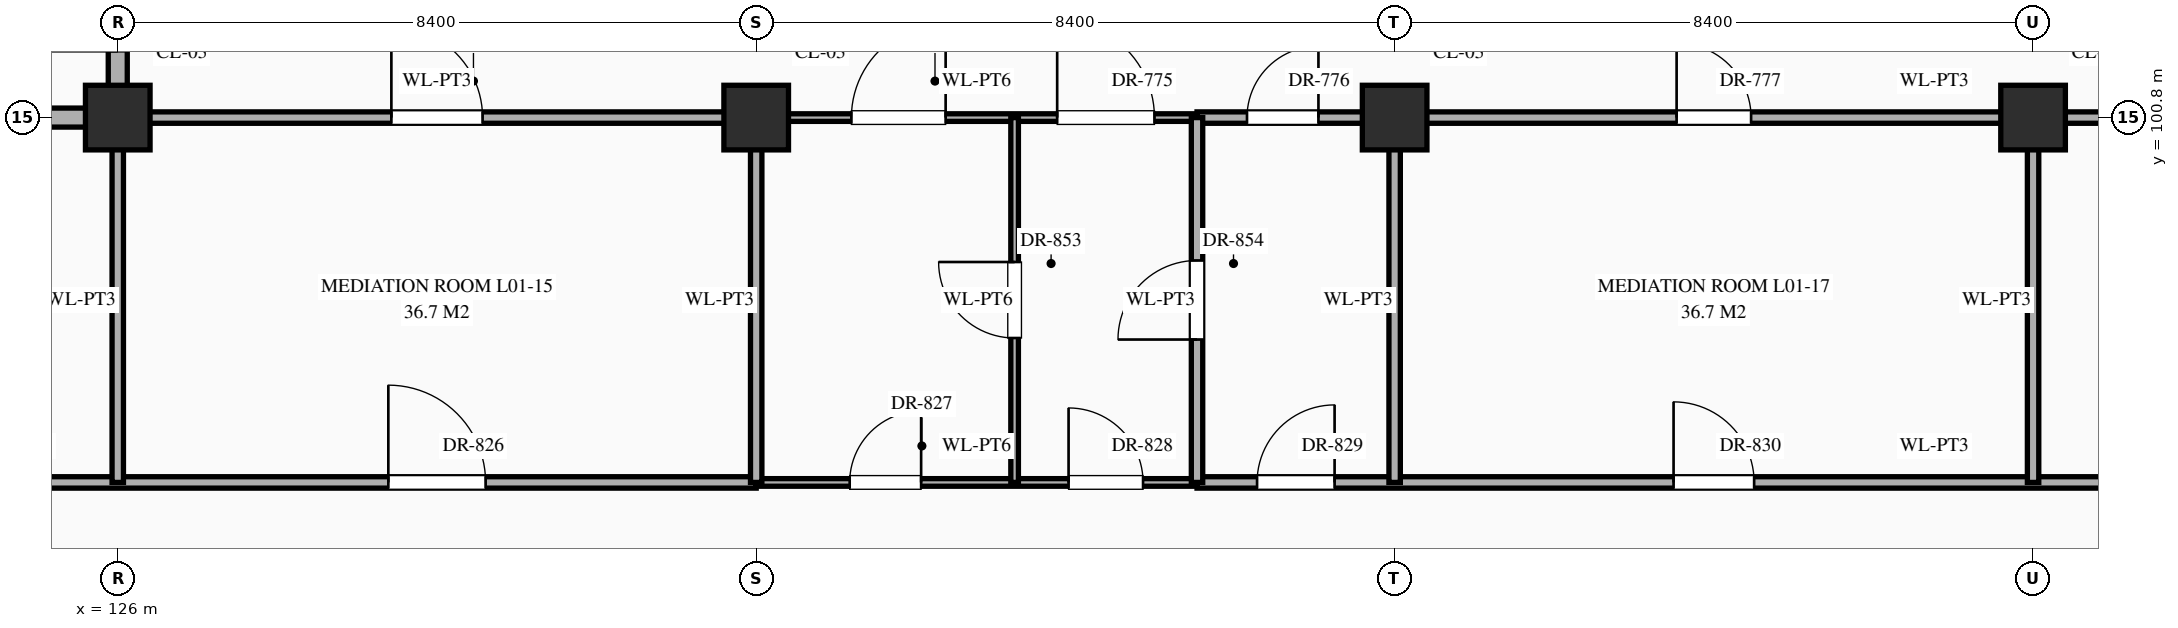
"""IFC4 building model, lengths in metres.
Left out: names, types, materials, properties, quantities, classifications, styles, units other than length and angle.
Written with IfcOpenShell. Run it as: python <this file> out.ifc"""

import sys

from ifc_helpers import new_model, si_unit, direction, frame, frame_2d, origin, origin_2d, place, context, subcontext, project, spatial, rectangle, extrude, element, fill, save


model = new_model("IFC4")
c1 = context("Model", 3, precision=1e-05, world=origin(), true_north=direction((0.0, 1.0)))
c2 = subcontext(c1, "Body", "Model", "MODEL_VIEW")
j1 = project(units=[si_unit("LENGTHUNIT", "METRE"), si_unit("PLANEANGLEUNIT", "RADIAN")], contexts=[c1])
p1 = place(None, origin())
s1 = spatial("IfcSite", under=j1, at=p1, CompositionType="ELEMENT")
p2 = place(p1, origin())
s2 = spatial("IfcBuilding", under=s1, at=p2, CompositionType="ELEMENT")
p3 = place(p2, origin())
s3 = spatial("IfcBuildingStorey", under=s2, at=p3, CompositionType="ELEMENT", Elevation=0.0)
for number, where, z_axis, x_axis in (
    (1, (126.0, 100.8, 0.0), (0.0, 0.0, 1.0), (1.0, 0.0, 0.0)),
    (2, (134.4, 100.8, 0.0), (0.0, 0.0, 1.0), (1.0, 0.0, 0.0)),
    (3, (142.8, 100.8, 0.0), (0.0, 0.0, 1.0), (1.0, 0.0, 0.0)),
    (4, (151.2, 100.8, 0.0), (0.0, 0.0, 1.0), (1.0, 0.0, 0.0)),
):
    element("IfcColumn", number, at=place(p3, frame(where, z_axis=z_axis, x_axis=x_axis)), inside=s3, PredefinedType="COLUMN", context=c2, shape_type="SweptSolid", body=[
        extrude(rectangle(XDim=0.85, YDim=0.85, at=origin_2d()), origin(), (0.0, 0.0, 1.0), 5.4),
    ])
p4 = place(p3, frame((115.0, 96.0, 0.0), z_axis=(0.0, 0.0, 1.0), x_axis=(1.0, 0.0, 0.0)))
e5 = element("IfcWall", 5, at=p4, inside=s3, PredefinedType="STANDARD", context=c2, shape_type="SweptSolid", body=[
    extrude(rectangle(XDim=19.4, YDim=0.15, at=frame_2d((9.7, 0.0))), origin(), (0.0, 0.0, 1.0), 5.12),
])
p5 = place(p4, frame((0.82, 0.0, 0.0)))
e6 = element("IfcOpeningElement", 6, at=p5, cuts=e5, PredefinedType="OPENING", context=c2, shape_type="SweptSolid", body=[
    extrude(rectangle(XDim=0.96, YDim=2.2, at=frame_2d((0.48, 1.1))), frame((0.0, 0.087, 0.0), z_axis=(0.0, -1.0, 0.0), x_axis=(1.0, 0.0, 0.0)), (0.0, 0.0, 1.0), 0.174),
])
p6 = place(p4, frame((6.18, 0.0, 0.0)))
e7 = element("IfcOpeningElement", 7, at=p6, cuts=e5, PredefinedType="OPENING", context=c2, shape_type="SweptSolid", body=[
    extrude(rectangle(XDim=1.24, YDim=2.3, at=frame_2d((0.62, 1.15))), frame((0.0, 0.087, 0.0), z_axis=(0.0, -1.0, 0.0), x_axis=(1.0, 0.0, 0.0)), (0.0, 0.0, 1.0), 0.174),
])
p7 = place(p4, frame((14.56, 0.0, 0.0)))
e8 = element("IfcOpeningElement", 8, at=p7, cuts=e5, PredefinedType="OPENING", context=c2, shape_type="SweptSolid", body=[
    extrude(rectangle(XDim=1.28, YDim=2.35, at=frame_2d((0.64, 1.175))), frame((0.0, 0.087, 0.0), z_axis=(0.0, -1.0, 0.0), x_axis=(1.0, 0.0, 0.0)), (0.0, 0.0, 1.0), 0.174),
])
p8 = place(p3, frame((134.4, 96.0, 0.0), z_axis=(0.0, 0.0, 1.0), x_axis=(1.0, 0.0, 0.0)))
e9 = element("IfcWall", 9, at=p8, inside=s3, PredefinedType="STANDARD", context=c2, shape_type="SweptSolid", body=[
    extrude(rectangle(XDim=5.8, YDim=0.1, at=frame_2d((2.9, 0.0))), origin(), (0.0, 0.0, 1.0), 5.12),
])
p9 = place(p8, frame((1.23, 0.0, 0.0)))
e10 = element("IfcOpeningElement", 10, at=p9, cuts=e9, PredefinedType="OPENING", context=c2, shape_type="SweptSolid", body=[
    extrude(rectangle(XDim=0.94, YDim=2.3, at=frame_2d((0.47, 1.15))), frame((0.0, 0.062, 0.0), z_axis=(0.0, -1.0, 0.0), x_axis=(1.0, 0.0, 0.0)), (0.0, 0.0, 1.0), 0.124),
])
p10 = place(p8, frame((4.11, 0.0, 0.0)))
e11 = element("IfcOpeningElement", 11, at=p10, cuts=e9, PredefinedType="OPENING", context=c2, shape_type="SweptSolid", body=[
    extrude(rectangle(XDim=0.98, YDim=2.35, at=frame_2d((0.49, 1.175))), frame((0.0, 0.062, 0.0), z_axis=(0.0, -1.0, 0.0), x_axis=(1.0, 0.0, 0.0)), (0.0, 0.0, 1.0), 0.124),
])
p11 = place(p3, frame((140.2, 96.0, 0.0), z_axis=(0.0, 0.0, 1.0), x_axis=(1.0, 0.0, 0.0)))
e12 = element("IfcWall", 12, at=p11, inside=s3, PredefinedType="STANDARD", context=c2, shape_type="SweptSolid", body=[
    extrude(rectangle(XDim=19.4, YDim=0.15, at=frame_2d((9.7, 0.0))), origin(), (0.0, 0.0, 1.0), 5.12),
])
p12 = place(p11, frame((0.79, 0.0, 0.0)))
e13 = element("IfcOpeningElement", 13, at=p12, cuts=e12, PredefinedType="OPENING", context=c2, shape_type="SweptSolid", body=[
    extrude(rectangle(XDim=1.02, YDim=2.4, at=frame_2d((0.51, 1.2))), frame((0.0, 0.087, 0.0), z_axis=(0.0, -1.0, 0.0), x_axis=(1.0, 0.0, 0.0)), (0.0, 0.0, 1.0), 0.174),
])
p13 = place(p11, frame((6.27, 0.0, 0.0)))
e14 = element("IfcOpeningElement", 14, at=p13, cuts=e12, PredefinedType="OPENING", context=c2, shape_type="SweptSolid", body=[
    extrude(rectangle(XDim=1.06, YDim=2.4, at=frame_2d((0.53, 1.2))), frame((0.0, 0.087, 0.0), z_axis=(0.0, -1.0, 0.0), x_axis=(1.0, 0.0, 0.0)), (0.0, 0.0, 1.0), 0.174),
])
p14 = place(p11, frame((14.63, 0.0, 0.0)))
e15 = element("IfcOpeningElement", 15, at=p14, cuts=e12, PredefinedType="OPENING", context=c2, shape_type="SweptSolid", body=[
    extrude(rectangle(XDim=1.14, YDim=2.4, at=frame_2d((0.57, 1.2))), frame((0.0, 0.087, 0.0), z_axis=(0.0, -1.0, 0.0), x_axis=(1.0, 0.0, 0.0)), (0.0, 0.0, 1.0), 0.174),
])
p15 = place(p3, frame((121.8, 100.8, 0.0), z_axis=(0.0, 0.0, 1.0), x_axis=(1.0, 0.0, 0.0)))
e16 = element("IfcWall", 16, at=p15, inside=s3, PredefinedType="STANDARD", context=c2, shape_type="SweptSolid", body=[
    extrude(rectangle(XDim=4.2, YDim=0.25, at=frame_2d((2.1, 0.0))), origin(), (0.0, 0.0, 1.0), 4.27),
])
p16 = place(p3, frame((126.0, 100.8, 0.0), z_axis=(0.0, 0.0, 1.0), x_axis=(1.0, 0.0, 0.0)))
e17 = element("IfcWall", 17, at=p16, inside=s3, PredefinedType="STANDARD", context=c2, shape_type="SweptSolid", body=[
    extrude(rectangle(XDim=8.4, YDim=0.15, at=frame_2d((4.2, 0.0))), origin(), (0.0, 0.0, 1.0), 4.27),
])
p17 = place(p16, frame((3.6, 0.0, 0.0)))
e18 = element("IfcOpeningElement", 18, at=p17, cuts=e17, PredefinedType="OPENING", context=c2, shape_type="SweptSolid", body=[
    extrude(rectangle(XDim=1.2, YDim=2.35, at=frame_2d((0.6, 1.175))), frame((0.0, 0.087, 0.0), z_axis=(0.0, -1.0, 0.0), x_axis=(1.0, 0.0, 0.0)), (0.0, 0.0, 1.0), 0.174),
])
p18 = place(p3, frame((134.4, 100.8, 0.0), z_axis=(0.0, 0.0, 1.0), x_axis=(1.0, 0.0, 0.0)))
e19 = element("IfcWall", 19, at=p18, inside=s3, PredefinedType="STANDARD", context=c2, shape_type="SweptSolid", body=[
    extrude(rectangle(XDim=5.8, YDim=0.1, at=frame_2d((2.9, 0.0))), origin(), (0.0, 0.0, 1.0), 4.27),
])
p19 = place(p18, frame((1.252, 0.0, 0.0)))
e20 = element("IfcOpeningElement", 20, at=p19, cuts=e19, PredefinedType="OPENING", context=c2, shape_type="SweptSolid", body=[
    extrude(rectangle(XDim=1.24, YDim=2.3, at=frame_2d((0.62, 1.15))), frame((0.0, 0.062, 0.0), z_axis=(0.0, -1.0, 0.0), x_axis=(1.0, 0.0, 0.0)), (0.0, 0.0, 1.0), 0.124),
])
p20 = place(p18, frame((3.96, 0.0, 0.0)))
e21 = element("IfcOpeningElement", 21, at=p20, cuts=e19, PredefinedType="OPENING", context=c2, shape_type="SweptSolid", body=[
    extrude(rectangle(XDim=1.28, YDim=2.35, at=frame_2d((0.64, 1.175))), frame((0.0, 0.062, 0.0), z_axis=(0.0, -1.0, 0.0), x_axis=(1.0, 0.0, 0.0)), (0.0, 0.0, 1.0), 0.124),
])
p21 = place(p3, frame((140.2, 100.8, 0.0), z_axis=(0.0, 0.0, 1.0), x_axis=(1.0, 0.0, 0.0)))
e22 = element("IfcWall", 22, at=p21, inside=s3, PredefinedType="STANDARD", context=c2, shape_type="SweptSolid", body=[
    extrude(rectangle(XDim=19.4, YDim=0.15, at=frame_2d((9.7, 0.0))), origin(), (0.0, 0.0, 1.0), 4.27),
])
p22 = place(p21, frame((0.657, 0.0, 0.0)))
e23 = element("IfcOpeningElement", 23, at=p22, cuts=e22, PredefinedType="OPENING", context=c2, shape_type="SweptSolid", body=[
    extrude(rectangle(XDim=0.94, YDim=2.3, at=frame_2d((0.47, 1.15))), frame((0.0, 0.087, 0.0), z_axis=(0.0, -1.0, 0.0), x_axis=(1.0, 0.0, 0.0)), (0.0, 0.0, 1.0), 0.174),
])
p23 = place(p21, frame((6.31, 0.0, 0.0)))
e24 = element("IfcOpeningElement", 24, at=p23, cuts=e22, PredefinedType="OPENING", context=c2, shape_type="SweptSolid", body=[
    extrude(rectangle(XDim=0.98, YDim=2.35, at=frame_2d((0.49, 1.175))), frame((0.0, 0.087, 0.0), z_axis=(0.0, -1.0, 0.0), x_axis=(1.0, 0.0, 0.0)), (0.0, 0.0, 1.0), 0.174),
])
p24 = place(p21, frame((14.69, 0.0, 0.0)))
e25 = element("IfcOpeningElement", 25, at=p24, cuts=e22, PredefinedType="OPENING", context=c2, shape_type="SweptSolid", body=[
    extrude(rectangle(XDim=1.02, YDim=2.4, at=frame_2d((0.51, 1.2))), frame((0.0, 0.087, 0.0), z_axis=(0.0, -1.0, 0.0), x_axis=(1.0, 0.0, 0.0)), (0.0, 0.0, 1.0), 0.174),
])
p25 = place(p3, frame((126.0, 96.0, 0.0), z_axis=(0.0, 0.0, 1.0), x_axis=(0.0, 1.0, 0.0)))
e26 = element("IfcWall", 26, at=p25, inside=s3, PredefinedType="STANDARD", context=c2, shape_type="SweptSolid", body=[
    extrude(rectangle(XDim=4.8, YDim=0.15, at=frame_2d((2.4, 0.0))), origin(), (0.0, 0.0, 1.0), 4.37),
])
p26 = place(p3, frame((126.0, 100.8, 0.0), z_axis=(0.0, 0.0, 1.0), x_axis=(0.0, 1.0, 0.0)))
e27 = element("IfcWall", 27, at=p26, inside=s3, PredefinedType="STANDARD", context=c2, shape_type="SweptSolid", body=[
    extrude(rectangle(XDim=3.6, YDim=0.25, at=frame_2d((1.8, 0.0))), origin(), (0.0, 0.0, 1.0), 4.37),
])
p27 = place(p26, frame((0.873, 0.0, 0.0)))
e28 = element("IfcOpeningElement", 28, at=p27, cuts=e27, PredefinedType="OPENING", context=c2, shape_type="SweptSolid", body=[
    extrude(rectangle(XDim=1.0, YDim=2.2, at=frame_2d((0.5, 1.1))), frame((0.0, 0.137, 0.0), z_axis=(0.0, -1.0, 0.0), x_axis=(1.0, 0.0, 0.0)), (0.0, 0.0, 1.0), 0.274),
])
p28 = place(p3, frame((134.4, 96.0, 0.0), z_axis=(0.0, 0.0, 1.0), x_axis=(0.0, 1.0, 0.0)))
e29 = element("IfcWall", 29, at=p28, inside=s3, PredefinedType="STANDARD", context=c2, shape_type="SweptSolid", body=[
    extrude(rectangle(XDim=4.8, YDim=0.15, at=frame_2d((2.4, 0.0))), origin(), (0.0, 0.0, 1.0), 4.37),
])
p29 = place(p3, frame((137.8, 96.0, 0.0), z_axis=(0.0, 0.0, 1.0), x_axis=(0.0, 1.0, 0.0)))
e30 = element("IfcWall", 30, at=p29, inside=s3, PredefinedType="STANDARD", context=c2, shape_type="SweptSolid", body=[
    extrude(rectangle(XDim=4.8, YDim=0.1, at=frame_2d((2.4, 0.0))), origin(), (0.0, 0.0, 1.0), 5.12),
])
p30 = place(p29, frame((1.9, 0.0, 0.0)))
e31 = element("IfcOpeningElement", 31, at=p30, cuts=e30, PredefinedType="OPENING", context=c2, shape_type="SweptSolid", body=[
    extrude(rectangle(XDim=1.0, YDim=2.25, at=frame_2d((0.5, 1.125))), frame((0.0, 0.062, 0.0), z_axis=(0.0, -1.0, 0.0), x_axis=(1.0, 0.0, 0.0)), (0.0, 0.0, 1.0), 0.124),
])
p31 = place(p3, frame((140.2, 96.0, 0.0), z_axis=(0.0, 0.0, 1.0), x_axis=(0.0, 1.0, 0.0)))
e32 = element("IfcWall", 32, at=p31, inside=s3, PredefinedType="STANDARD", context=c2, shape_type="SweptSolid", body=[
    extrude(rectangle(XDim=4.8, YDim=0.15, at=frame_2d((2.4, 0.0))), origin(), (0.0, 0.0, 1.0), 5.12),
])
p32 = place(p31, frame((1.88, 0.0, 0.0)))
e33 = element("IfcOpeningElement", 33, at=p32, cuts=e32, PredefinedType="OPENING", context=c2, shape_type="SweptSolid", body=[
    extrude(rectangle(XDim=1.04, YDim=2.2, at=frame_2d((0.52, 1.1))), frame((0.0, 0.087, 0.0), z_axis=(0.0, -1.0, 0.0), x_axis=(1.0, 0.0, 0.0)), (0.0, 0.0, 1.0), 0.174),
])
for number, where, z_axis, x_axis in (
    (34, (142.8, 96.0, 0.0), (0.0, 0.0, 1.0), (0.0, 1.0, 0.0)),
    (35, (151.2, 96.0, 0.0), (0.0, 0.0, 1.0), (0.0, 1.0, 0.0)),
):
    element("IfcWall", number, at=place(p3, frame(where, z_axis=z_axis, x_axis=x_axis)), inside=s3, PredefinedType="STANDARD", context=c2, shape_type="SweptSolid", body=[
        extrude(rectangle(XDim=4.8, YDim=0.15, at=frame_2d((2.4, 0.0))), origin(), (0.0, 0.0, 1.0), 4.37),
    ])
p33 = place(p17, origin())
e36 = element("IfcDoor", 36, at=p33, inside=s3, OperationType="SINGLE_SWING_LEFT", PredefinedType="DOOR", context=c2, shape_type="SweptSolid", body=[
    extrude(rectangle(XDim=1.2, YDim=2.35, at=frame_2d((0.6, 1.175))), frame((0.0, 0.025, 0.0), z_axis=(0.0, -1.0, 0.0), x_axis=(1.0, 0.0, 0.0)), (0.0, 0.0, 1.0), 0.05),
])
fill(e18, e36)
p34 = place(p19, origin())
e37 = element("IfcDoor", 37, at=p34, inside=s3, OperationType="SINGLE_SWING_RIGHT", PredefinedType="DOOR", context=c2, shape_type="SweptSolid", body=[
    extrude(rectangle(XDim=1.24, YDim=2.3, at=frame_2d((0.62, 1.15))), frame((0.0, 0.025, 0.0), z_axis=(0.0, -1.0, 0.0), x_axis=(1.0, 0.0, 0.0)), (0.0, 0.0, 1.0), 0.05),
])
fill(e20, e37)
p35 = place(p20, origin())
e38 = element("IfcDoor", 38, at=p35, inside=s3, OperationType="SINGLE_SWING_LEFT", PredefinedType="DOOR", context=c2, shape_type="SweptSolid", body=[
    extrude(rectangle(XDim=1.28, YDim=2.35, at=frame_2d((0.64, 1.175))), frame((0.0, 0.025, 0.0), z_axis=(0.0, -1.0, 0.0), x_axis=(1.0, 0.0, 0.0)), (0.0, 0.0, 1.0), 0.05),
])
fill(e21, e38)
p36 = place(p22, origin())
e39 = element("IfcDoor", 39, at=p36, inside=s3, OperationType="SINGLE_SWING_RIGHT", PredefinedType="DOOR", context=c2, shape_type="SweptSolid", body=[
    extrude(rectangle(XDim=0.94, YDim=2.3, at=frame_2d((0.47, 1.15))), frame((0.0, 0.025, 0.0), z_axis=(0.0, -1.0, 0.0), x_axis=(1.0, 0.0, 0.0)), (0.0, 0.0, 1.0), 0.05),
])
fill(e23, e39)
p37 = place(p23, origin())
e40 = element("IfcDoor", 40, at=p37, inside=s3, OperationType="SINGLE_SWING_LEFT", PredefinedType="DOOR", context=c2, shape_type="SweptSolid", body=[
    extrude(rectangle(XDim=0.98, YDim=2.35, at=frame_2d((0.49, 1.175))), frame((0.0, 0.025, 0.0), z_axis=(0.0, -1.0, 0.0), x_axis=(1.0, 0.0, 0.0)), (0.0, 0.0, 1.0), 0.05),
])
fill(e24, e40)
p38 = place(p7, origin())
e41 = element("IfcDoor", 41, at=p38, inside=s3, OperationType="SINGLE_SWING_LEFT", PredefinedType="DOOR", context=c2, shape_type="SweptSolid", body=[
    extrude(rectangle(XDim=1.28, YDim=2.35, at=frame_2d((0.64, 1.175))), frame((0.0, 0.025, 0.0), z_axis=(0.0, -1.0, 0.0), x_axis=(1.0, 0.0, 0.0)), (0.0, 0.0, 1.0), 0.05),
])
fill(e8, e41)
p39 = place(p9, origin())
e42 = element("IfcDoor", 42, at=p39, inside=s3, OperationType="SINGLE_SWING_RIGHT", PredefinedType="DOOR", context=c2, shape_type="SweptSolid", body=[
    extrude(rectangle(XDim=0.94, YDim=2.3, at=frame_2d((0.47, 1.15))), frame((0.0, 0.025, 0.0), z_axis=(0.0, -1.0, 0.0), x_axis=(1.0, 0.0, 0.0)), (0.0, 0.0, 1.0), 0.05),
])
fill(e10, e42)
p40 = place(p10, origin())
e43 = element("IfcDoor", 43, at=p40, inside=s3, OperationType="SINGLE_SWING_LEFT", PredefinedType="DOOR", context=c2, shape_type="SweptSolid", body=[
    extrude(rectangle(XDim=0.98, YDim=2.35, at=frame_2d((0.49, 1.175))), frame((0.0, 0.025, 0.0), z_axis=(0.0, -1.0, 0.0), x_axis=(1.0, 0.0, 0.0)), (0.0, 0.0, 1.0), 0.05),
])
fill(e11, e43)
p41 = place(p12, origin())
e44 = element("IfcDoor", 44, at=p41, inside=s3, OperationType="SINGLE_SWING_RIGHT", PredefinedType="DOOR", context=c2, shape_type="SweptSolid", body=[
    extrude(rectangle(XDim=1.02, YDim=2.4, at=frame_2d((0.51, 1.2))), frame((0.0, 0.025, 0.0), z_axis=(0.0, -1.0, 0.0), x_axis=(1.0, 0.0, 0.0)), (0.0, 0.0, 1.0), 0.05),
])
fill(e13, e44)
p42 = place(p13, origin())
e45 = element("IfcDoor", 45, at=p42, inside=s3, OperationType="SINGLE_SWING_LEFT", PredefinedType="DOOR", context=c2, shape_type="SweptSolid", body=[
    extrude(rectangle(XDim=1.06, YDim=2.4, at=frame_2d((0.53, 1.2))), frame((0.0, 0.025, 0.0), z_axis=(0.0, -1.0, 0.0), x_axis=(1.0, 0.0, 0.0)), (0.0, 0.0, 1.0), 0.05),
])
fill(e14, e45)
p43 = place(p30, origin())
e46 = element("IfcDoor", 46, at=p43, inside=s3, OperationType="SINGLE_SWING_RIGHT", PredefinedType="DOOR", context=c2, shape_type="SweptSolid", body=[
    extrude(rectangle(XDim=1.0, YDim=2.25, at=frame_2d((0.5, 1.125))), frame((0.0, 0.025, 0.0), z_axis=(0.0, -1.0, 0.0), x_axis=(1.0, 0.0, 0.0)), (0.0, 0.0, 1.0), 0.05),
])
fill(e31, e46)
p44 = place(p32, origin())
e47 = element("IfcDoor", 47, at=p44, inside=s3, OperationType="SINGLE_SWING_LEFT", PredefinedType="DOOR", context=c2, shape_type="SweptSolid", body=[
    extrude(rectangle(XDim=1.04, YDim=2.2, at=frame_2d((0.52, 1.1))), frame((0.0, 0.025, 0.0), z_axis=(0.0, -1.0, 0.0), x_axis=(1.0, 0.0, 0.0)), (0.0, 0.0, 1.0), 0.05),
])
fill(e33, e47)
save(model, sys.argv[1])
